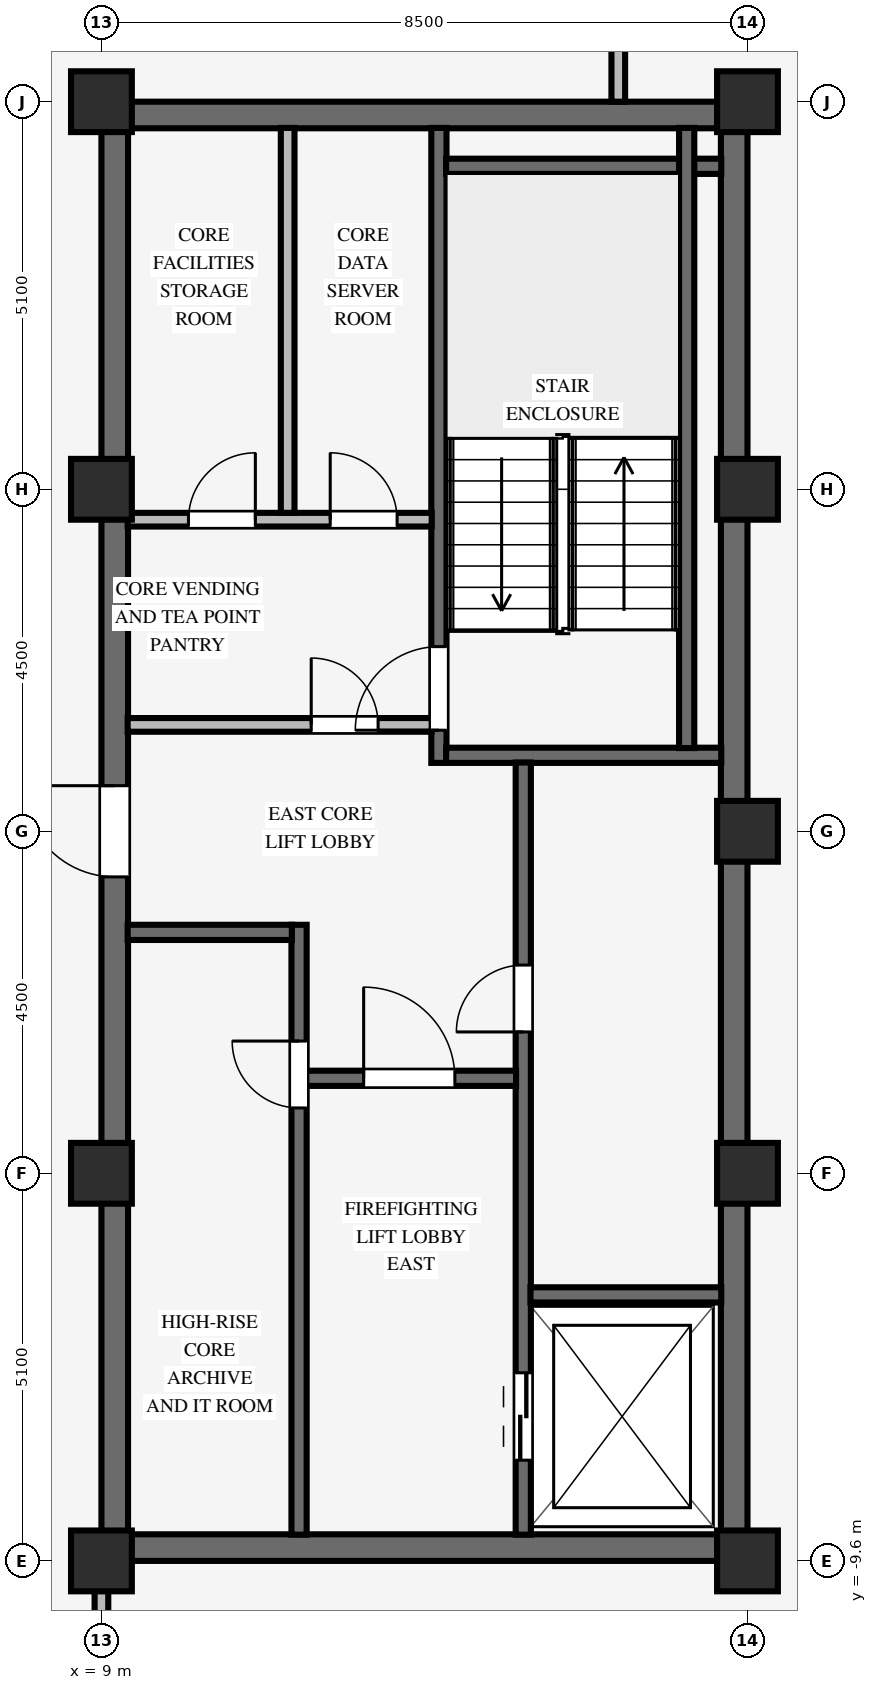
"""IFC4 building model, lengths in metres.
Left out: names, types, materials, properties, quantities, classifications, styles, units other than length and angle.
Written with IfcOpenShell. Run it as: python <this file> out.ifc"""

import sys

from ifc_helpers import new_model, si_unit, direction, frame, frame_2d, origin, origin_2d, place, context, subcontext, project, spatial, rectangle, extrude, source, transform, mapped, element, fill, save


model = new_model("IFC4")
c1 = context("Model", 3, precision=1e-05, world=origin(), true_north=direction((0.0, 1.0)))
c2 = subcontext(c1, "Body", "Model", "MODEL_VIEW")
j1 = project(units=[si_unit("LENGTHUNIT", "METRE"), si_unit("PLANEANGLEUNIT", "RADIAN")], contexts=[c1])
p1 = place(None, origin())
s1 = spatial("IfcSite", under=j1, at=p1, CompositionType="ELEMENT")
p2 = place(p1, origin())
s2 = spatial("IfcBuilding", under=s1, at=p2, CompositionType="ELEMENT")
p3 = place(p2, frame((0.0, 0.0, 265.25)))
s3 = spatial("IfcBuildingStorey", under=s2, at=p3, CompositionType="ELEMENT", Elevation=265.25)
for number, where, z_axis, x_axis in (
    (1, (9.0, -9.425, 0.0), (0.0, 0.0, 1.0), (1.0, 0.0, 0.0)),
    (2, (9.0, 9.425, 0.0), (0.0, 0.0, 1.0), (1.0, 0.0, 0.0)),
):
    element("IfcWall", number, at=place(p3, frame(where, z_axis=z_axis, x_axis=x_axis)), inside=s3, PredefinedType="SHEAR", context=c2, shape_type="SweptSolid", body=[
        extrude(rectangle(XDim=8.5, YDim=0.35, at=frame_2d((4.25, 0.0))), origin(), (0.0, 0.0, 1.0), 3.37),
    ])
p4 = place(p3, frame((9.175, -9.255, 0.0), z_axis=(0.0, 0.0, 1.0), x_axis=(0.0, 1.0, 0.0)))
e3 = element("IfcWall", 3, at=p4, inside=s3, PredefinedType="SHEAR", context=c2, shape_type="SweptSolid", body=[
    extrude(rectangle(XDim=18.51, YDim=0.35, at=frame_2d((9.255, 0.0))), origin(), (0.0, 0.0, 1.0), 3.37),
])
p5 = place(p4, frame((8.655, 0.0, 0.0)))
e4 = element("IfcOpeningElement", 4, at=p5, cuts=e3, PredefinedType="OPENING", context=c2, shape_type="SweptSolid", body=[
    extrude(rectangle(XDim=1.2, YDim=2.15, at=frame_2d((0.6, 1.075))), frame((0.0, 0.185, 0.0), z_axis=(0.0, -1.0, 0.0), x_axis=(1.0, 0.0, 0.0)), (0.0, 0.0, 1.0), 0.37),
])
p6 = place(p3, frame((17.325, -9.255, 0.0), z_axis=(0.0, 0.0, 1.0), x_axis=(0.0, 1.0, 0.0)))
e5 = element("IfcWall", 5, at=p6, inside=s3, PredefinedType="SHEAR", context=c2, shape_type="SweptSolid", body=[
    extrude(rectangle(XDim=18.51, YDim=0.35, at=frame_2d((9.255, 0.0))), origin(), (0.0, 0.0, 1.0), 3.37),
])
for number, where, z_axis, x_axis in (
    (6, (9.0, -9.6, 0.0), (0.0, 0.0, 1.0), (1.0, 0.0, 0.0)),
    (7, (9.0, -4.5, 0.0), (0.0, 0.0, 1.0), (1.0, 0.0, 0.0)),
    (8, (9.0, 4.5, 0.0), (0.0, 0.0, 1.0), (1.0, 0.0, 0.0)),
    (9, (9.0, 9.6, 0.0), (0.0, 0.0, 1.0), (1.0, 0.0, 0.0)),
    (10, (17.5, -9.6, 0.0), (0.0, 0.0, 1.0), (1.0, 0.0, 0.0)),
    (11, (17.5, -4.5, 0.0), (0.0, 0.0, 1.0), (1.0, 0.0, 0.0)),
    (12, (17.5, 4.5, 0.0), (0.0, 0.0, 1.0), (1.0, 0.0, 0.0)),
    (13, (17.5, 9.6, 0.0), (0.0, 0.0, 1.0), (1.0, 0.0, 0.0)),
    (14, (17.5, 0.0, 0.0), (0.0, 0.0, 1.0), (1.0, 0.0, 0.0)),
):
    element("IfcColumn", number, at=place(p3, frame(where, z_axis=z_axis, x_axis=x_axis)), inside=s3, PredefinedType="COLUMN", context=c2, shape_type="SweptSolid", body=[
        extrude(rectangle(XDim=0.8, YDim=0.8, at=origin_2d()), origin(), (0.0, 0.0, 1.0), 3.37),
    ])
p7 = place(p3, frame((13.44, 0.9, 0.0), z_axis=(0.0, 0.0, 1.0), x_axis=(0.0, 1.0, 0.0)))
e15 = element("IfcWall", 15, at=p7, inside=s3, PredefinedType="SHEAR", context=c2, shape_type="SweptSolid", body=[
    extrude(rectangle(XDim=8.355, YDim=0.2, at=frame_2d((4.177, 0.0))), origin(), (0.0, 0.0, 1.0), 3.37),
])
p8 = place(p7, frame((0.43, 0.0, 0.0)))
e16 = element("IfcOpeningElement", 16, at=p8, cuts=e15, PredefinedType="OPENING", context=c2, shape_type="SweptSolid", body=[
    extrude(rectangle(XDim=1.1, YDim=2.15, at=frame_2d((0.55, 1.075))), frame((0.0, 0.11, 0.0), z_axis=(0.0, -1.0, 0.0), x_axis=(1.0, 0.0, 0.0)), (0.0, 0.0, 1.0), 0.22),
])
for number, where, z_axis, x_axis in (
    (17, (13.535, 1.0, 0.0), (0.0, 0.0, 1.0), (1.0, 0.0, 0.0)),
    (18, (13.535, 8.75, 0.0), (0.0, 0.0, 1.0), (1.0, 0.0, 0.0)),
):
    element("IfcWall", number, at=place(p3, frame(where, z_axis=z_axis, x_axis=x_axis)), inside=s3, PredefinedType="SHEAR", context=c2, shape_type="SweptSolid", body=[
        extrude(rectangle(XDim=3.62, YDim=0.2, at=frame_2d((1.81, 0.0))), origin(), (0.0, 0.0, 1.0), 3.37),
    ])
p9 = place(p3, frame((16.7, 1.095, 0.0), z_axis=(0.0, 0.0, 1.0), x_axis=(0.0, 1.0, 0.0)))
e19 = element("IfcWall", 19, at=p9, inside=s3, PredefinedType="SHEAR", context=c2, shape_type="SweptSolid", body=[
    extrude(rectangle(XDim=8.16, YDim=0.2, at=frame_2d((4.08, 0.0))), origin(), (0.0, 0.0, 1.0), 3.37),
])
p10 = place(p3, frame((14.55, -9.255, 0.0), z_axis=(0.0, 0.0, 1.0), x_axis=(0.0, 1.0, 0.0)))
e20 = element("IfcWall", 20, at=p10, inside=s3, PredefinedType="SHEAR", context=c2, shape_type="SweptSolid", body=[
    extrude(rectangle(XDim=10.16, YDim=0.2, at=frame_2d((5.08, 0.0))), origin(), (0.0, 0.0, 1.0), 3.37),
])
p11 = place(p10, frame((6.615, 0.0, 0.0)))
e21 = element("IfcOpeningElement", 21, at=p11, cuts=e20, PredefinedType="OPENING", context=c2, shape_type="SweptSolid", body=[
    extrude(rectangle(XDim=0.88, YDim=2.1, at=frame_2d((0.44, 1.05))), frame((0.0, 0.11, 0.0), z_axis=(0.0, -1.0, 0.0), x_axis=(1.0, 0.0, 0.0)), (0.0, 0.0, 1.0), 0.22),
])
p12 = place(p10, frame((0.98, 0.0, 0.0)))
e22 = element("IfcOpeningElement", 22, at=p12, cuts=e20, PredefinedType="OPENING", context=c2, shape_type="SweptSolid", body=[
    extrude(rectangle(XDim=1.15, YDim=2.15, at=frame_2d((0.575, 1.075))), frame((0.0, 0.11, 0.0), z_axis=(0.0, -1.0, 0.0), x_axis=(1.0, 0.0, 0.0)), (0.0, 0.0, 1.0), 0.22),
])
p13 = place(p3, frame((14.645, -6.1, 0.0), z_axis=(0.0, 0.0, 1.0), x_axis=(1.0, 0.0, 0.0)))
e23 = element("IfcWall", 23, at=p13, inside=s3, PredefinedType="SHEAR", context=c2, shape_type="SweptSolid", body=[
    extrude(rectangle(XDim=2.51, YDim=0.2, at=frame_2d((1.255, 0.0))), origin(), (0.0, 0.0, 1.0), 3.37),
])
p14 = place(p3, frame((11.6, -9.255, 0.0), z_axis=(0.0, 0.0, 1.0), x_axis=(0.0, 1.0, 0.0)))
e24 = element("IfcWall", 24, at=p14, inside=s3, PredefinedType="SHEAR", context=c2, shape_type="SweptSolid", body=[
    extrude(rectangle(XDim=8.025, YDim=0.2, at=frame_2d((4.012, 0.0))), origin(), (0.0, 0.0, 1.0), 3.37),
])
p15 = place(p14, frame((5.615, 0.0, 0.0)))
e25 = element("IfcOpeningElement", 25, at=p15, cuts=e24, PredefinedType="OPENING", context=c2, shape_type="SweptSolid", body=[
    extrude(rectangle(XDim=0.88, YDim=2.1, at=frame_2d((0.44, 1.05))), frame((0.0, 0.11, 0.0), z_axis=(0.0, -1.0, 0.0), x_axis=(1.0, 0.0, 0.0)), (0.0, 0.0, 1.0), 0.22),
])
p16 = place(p3, frame((11.695, -3.25, 0.0), z_axis=(0.0, 0.0, 1.0), x_axis=(1.0, 0.0, 0.0)))
e26 = element("IfcWall", 26, at=p16, inside=s3, PredefinedType="SHEAR", context=c2, shape_type="SweptSolid", body=[
    extrude(rectangle(XDim=2.76, YDim=0.2, at=frame_2d((1.38, 0.0))), origin(), (0.0, 0.0, 1.0), 3.37),
])
p17 = place(p16, frame((0.755, 0.0, 0.0)))
e27 = element("IfcOpeningElement", 27, at=p17, cuts=e26, PredefinedType="OPENING", context=c2, shape_type="SweptSolid", body=[
    extrude(rectangle(XDim=1.2, YDim=2.15, at=frame_2d((0.6, 1.075))), frame((0.0, 0.11, 0.0), z_axis=(0.0, -1.0, 0.0), x_axis=(1.0, 0.0, 0.0)), (0.0, 0.0, 1.0), 0.22),
])
p18 = place(p3, frame((9.345, -1.33, 0.0), z_axis=(0.0, 0.0, 1.0), x_axis=(1.0, 0.0, 0.0)))
e28 = element("IfcWall", 28, at=p18, inside=s3, PredefinedType="SHEAR", context=c2, shape_type="SweptSolid", body=[
    extrude(rectangle(XDim=2.16, YDim=0.2, at=frame_2d((1.08, 0.0))), origin(), (0.0, 0.0, 1.0), 3.37),
])
p19 = place(p3, frame((9.345, 1.4, 0.0), z_axis=(0.0, 0.0, 1.0), x_axis=(1.0, 0.0, 0.0)))
e29 = element("IfcWall", 29, at=p19, inside=s3, PredefinedType="PARTITIONING", context=c2, shape_type="SweptSolid", body=[
    extrude(rectangle(XDim=4.0, YDim=0.18, at=frame_2d((2.0, 0.0))), origin(), (0.0, 0.0, 1.0), 3.36),
])
p20 = place(p19, frame((2.415, 0.0, 0.0)))
e30 = element("IfcOpeningElement", 30, at=p20, cuts=e29, PredefinedType="OPENING", context=c2, shape_type="SweptSolid", body=[
    extrude(rectangle(XDim=0.88, YDim=2.1, at=frame_2d((0.44, 1.05))), frame((0.0, 0.1, 0.0), z_axis=(0.0, -1.0, 0.0), x_axis=(1.0, 0.0, 0.0)), (0.0, 0.0, 1.0), 0.2),
])
p21 = place(p3, frame((9.345, 4.1, 0.0), z_axis=(0.0, 0.0, 1.0), x_axis=(1.0, 0.0, 0.0)))
e31 = element("IfcWall", 31, at=p21, inside=s3, PredefinedType="PARTITIONING", context=c2, shape_type="SweptSolid", body=[
    extrude(rectangle(XDim=4.0, YDim=0.18, at=frame_2d((2.0, 0.0))), origin(), (0.0, 0.0, 1.0), 3.36),
])
p22 = place(p21, frame((0.8, 0.0, 0.0)))
e32 = element("IfcOpeningElement", 32, at=p22, cuts=e31, PredefinedType="OPENING", context=c2, shape_type="SweptSolid", body=[
    extrude(rectangle(XDim=0.88, YDim=2.1, at=frame_2d((0.44, 1.05))), frame((0.0, 0.1, 0.0), z_axis=(0.0, -1.0, 0.0), x_axis=(1.0, 0.0, 0.0)), (0.0, 0.0, 1.0), 0.2),
])
p23 = place(p21, frame((2.665, 0.0, 0.0)))
e33 = element("IfcOpeningElement", 33, at=p23, cuts=e31, PredefinedType="OPENING", context=c2, shape_type="SweptSolid", body=[
    extrude(rectangle(XDim=0.88, YDim=2.1, at=frame_2d((0.44, 1.05))), frame((0.0, 0.1, 0.0), z_axis=(0.0, -1.0, 0.0), x_axis=(1.0, 0.0, 0.0)), (0.0, 0.0, 1.0), 0.2),
])
p24 = place(p3, frame((11.45, 4.19, 0.0), z_axis=(0.0, 0.0, 1.0), x_axis=(0.0, 1.0, 0.0)))
e34 = element("IfcWall", 34, at=p24, inside=s3, PredefinedType="PARTITIONING", context=c2, shape_type="SweptSolid", body=[
    extrude(rectangle(XDim=5.065, YDim=0.18, at=frame_2d((2.532, 0.0))), origin(), (0.0, 0.0, 1.0), 3.36),
])
p25 = place(p3, frame((9.0, -15.314, 0.0), z_axis=(0.0, 0.0, 1.0), x_axis=(0.0, 1.0, 0.0)))
e35 = element("IfcWall", 35, at=p25, inside=s3, PredefinedType="PARTITIONING", context=c2, shape_type="SweptSolid", body=[
    extrude(rectangle(XDim=5.318, YDim=0.18, at=frame_2d((2.659, 0.0))), origin(), (0.0, 0.0, 1.0), 2.892),
])
p26 = place(p25, frame((2.179, 0.0, 0.0)))
e36 = element("IfcOpeningElement", 36, at=p26, cuts=e35, PredefinedType="OPENING", context=c2, shape_type="SweptSolid", body=[
    extrude(rectangle(XDim=0.96, YDim=2.1, at=frame_2d((0.48, 1.05))), frame((0.0, 0.1, 0.0), z_axis=(0.0, -1.0, 0.0), x_axis=(1.0, 0.0, 0.0)), (0.0, 0.0, 1.0), 0.2),
])
p27 = place(p3, frame((15.8, 9.6, 0.0), z_axis=(0.0, 0.0, 1.0), x_axis=(0.0, 1.0, 0.0)))
e37 = element("IfcWall", 37, at=p27, inside=s3, PredefinedType="PARTITIONING", context=c2, shape_type="SweptSolid", body=[
    extrude(rectangle(XDim=2.514, YDim=0.18, at=frame_2d((1.257, 0.0))), origin(), (0.0, 0.0, 1.0), 3.36),
])
m1 = source(origin(), c2, "Body", "SweptSolid", [
    extrude(rectangle(XDim=1.1, YDim=2.15, at=frame_2d((0.55, 1.075))), frame((0.0, 0.025, 0.0), z_axis=(0.0, -1.0, 0.0), x_axis=(1.0, 0.0, 0.0)), (0.0, 0.0, 1.0), 0.05),
])
p28 = place(p8, origin())
e38 = element("IfcDoor", 38, at=p28, inside=s3, OperationType="SINGLE_SWING_LEFT", PredefinedType="DOOR", context=c2, shape_type="MappedRepresentation", body=[
    mapped(m1, transform((0.0, 0.0, 0.0), scale=1.0)),
])
fill(e16, e38)
m2 = source(origin(), c2, "Body", "SweptSolid", [
    extrude(rectangle(XDim=0.88, YDim=2.1, at=frame_2d((0.44, 1.05))), frame((0.0, 0.025, 0.0), z_axis=(0.0, -1.0, 0.0), x_axis=(1.0, 0.0, 0.0)), (0.0, 0.0, 1.0), 0.05),
])
p29 = place(p11, origin())
e39 = element("IfcDoor", 39, at=p29, inside=s3, OperationType="SINGLE_SWING_LEFT", PredefinedType="DOOR", context=c2, shape_type="MappedRepresentation", body=[
    mapped(m2, transform((0.0, 0.0, 0.0), scale=1.0)),
])
fill(e21, e39)
m3 = source(origin(), c2, "Body", "SweptSolid", [
    extrude(rectangle(XDim=1.2, YDim=2.15, at=frame_2d((0.6, 1.075))), frame((0.0, 0.025, 0.0), z_axis=(0.0, -1.0, 0.0), x_axis=(1.0, 0.0, 0.0)), (0.0, 0.0, 1.0), 0.05),
])
p30 = place(p17, origin())
e40 = element("IfcDoor", 40, at=p30, inside=s3, OperationType="SINGLE_SWING_LEFT", PredefinedType="DOOR", context=c2, shape_type="MappedRepresentation", body=[
    mapped(m3, transform((0.0, 0.0, 0.0), scale=1.0)),
])
fill(e27, e40)
p31 = place(p15, origin())
e41 = element("IfcDoor", 41, at=p31, inside=s3, OperationType="SINGLE_SWING_RIGHT", PredefinedType="DOOR", context=c2, shape_type="MappedRepresentation", body=[
    mapped(m2, transform((0.0, 0.0, 0.0), scale=1.0)),
])
fill(e25, e41)
p32 = place(p5, origin())
e42 = element("IfcDoor", 42, at=p32, inside=s3, OperationType="SINGLE_SWING_RIGHT", PredefinedType="DOOR", context=c2, shape_type="MappedRepresentation", body=[
    mapped(m3, transform((0.0, 0.0, 0.0), scale=1.0)),
])
fill(e4, e42)
p33 = place(p20, origin())
e43 = element("IfcDoor", 43, at=p33, inside=s3, OperationType="SINGLE_SWING_LEFT", PredefinedType="DOOR", context=c2, shape_type="MappedRepresentation", body=[
    mapped(m2, transform((0.0, 0.0, 0.0), scale=1.0)),
])
fill(e30, e43)
p34 = place(p22, origin())
e44 = element("IfcDoor", 44, at=p34, inside=s3, OperationType="SINGLE_SWING_RIGHT", PredefinedType="DOOR", context=c2, shape_type="MappedRepresentation", body=[
    mapped(m2, transform((0.0, 0.0, 0.0), scale=1.0)),
])
fill(e32, e44)
p35 = place(p23, origin())
e45 = element("IfcDoor", 45, at=p35, inside=s3, OperationType="SINGLE_SWING_LEFT", PredefinedType="DOOR", context=c2, shape_type="MappedRepresentation", body=[
    mapped(m2, transform((0.0, 0.0, 0.0), scale=1.0)),
])
fill(e33, e45)
m4 = source(origin(), c2, "Body", "SweptSolid", [
    extrude(rectangle(XDim=1.15, YDim=2.15, at=frame_2d((0.575, 1.075))), frame((0.0, 0.025, 0.0), z_axis=(0.0, -1.0, 0.0), x_axis=(1.0, 0.0, 0.0)), (0.0, 0.0, 1.0), 0.05),
])
p36 = place(p12, origin())
e46 = element("IfcDoor", 46, at=p36, inside=s3, OperationType="DOUBLE_DOOR_SLIDING", PredefinedType="DOOR", context=c2, shape_type="MappedRepresentation", body=[
    mapped(m4, transform((0.0, 0.0, 0.0), scale=1.0)),
])
fill(e22, e46)
save(model, sys.argv[1])
